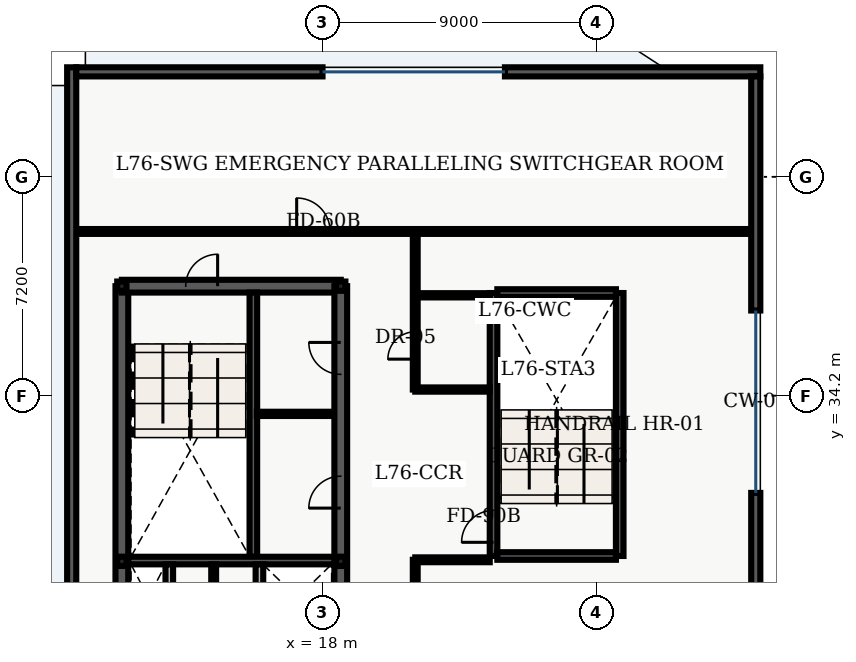
"""IFC4 building model, lengths in metres.
Left out: names, types, materials, properties, quantities, classifications, styles, units other than length and angle.
Written with IfcOpenShell. Run it as: python <this file> out.ifc"""

import sys

from ifc_helpers import new_model, entity, si_unit, converted_unit, direction, frame, origin_with_axes, origin_2d_with_axis, place, context, subcontext, project, spatial, polyline, rectangle, hollow_rectangle, outline, extrude, element, fill, save


model = new_model("IFC4")
c1 = context("Model", 3, precision=1e-05, world=origin_with_axes(), true_north=direction((0.0, 1.0)))
c2 = subcontext(c1, "Body", "Model", "MODEL_VIEW")
j1 = project(units=[si_unit("LENGTHUNIT", "METRE"), converted_unit("PLANEANGLEUNIT", "DEGREE", entity("IfcPlaneAngleMeasure", 0.017), si_unit("PLANEANGLEUNIT", "RADIAN"), dimensions=[0, 0, 0, 0, 0, 0, 0])], contexts=[c1])
p1 = place(None, origin_with_axes())
s1 = spatial("IfcSite", under=j1, at=p1, CompositionType="ELEMENT")
p2 = place(p1, origin_with_axes())
s2 = spatial("IfcBuilding", under=s1, at=p2, CompositionType="ELEMENT")
p3 = place(p2, frame((0.0, 0.0, 308.7), z_axis=(0.0, 0.0, 1.0), x_axis=(1.0, 0.0, 0.0)))
s3 = spatial("IfcBuildingStorey", under=s2, at=p3, CompositionType="ELEMENT", Elevation=308.7)
p4 = place(p3, frame((11.4, 10.8, 0.0), z_axis=(0.0, 0.0, 1.0), x_axis=(0.0, 1.0, 0.0)))
e1 = element("IfcWall", 1, at=p4, inside=s3, PredefinedType="SHEAR", context=c2, shape_type="SweptSolid", body=[
    extrude(outline(polyline([(0.0, -0.21), (27.0, -0.21), (27.0, 0.21), (0.0, 0.21), (0.0, -0.21)])), origin_with_axes(), (0.0, 0.0, 1.0), 3.64),
])
p5 = place(p3, frame((11.4, 37.8, 0.0), z_axis=(0.0, 0.0, 1.0), x_axis=(1.0, 0.0, 0.0)))
e2 = element("IfcWall", 2, at=p5, inside=s3, PredefinedType="SHEAR", context=c2, shape_type="SweptSolid", body=[
    extrude(outline(polyline([(0.0, -0.21), (7.2, -0.21), (7.2, 0.21), (0.0, 0.21), (0.0, -0.21)])), origin_with_axes(), (0.0, 0.0, 1.0), 3.64),
])
p6 = place(p5, frame((2.625, 0.0, 0.0), z_axis=(0.0, 0.0, 1.0), x_axis=(1.0, 0.0, 0.0)))
e3 = element("IfcOpeningElement", 3, at=p6, cuts=e2, PredefinedType="OPENING", context=c2, shape_type="SweptSolid", body=[
    extrude(rectangle(XDim=1.05, YDim=0.44, at=origin_2d_with_axis()), origin_with_axes(), (0.0, 0.0, 1.0), 2.15),
])
p7 = place(p3, frame((18.6, 24.3, 0.0), z_axis=(0.0, 0.0, 1.0), x_axis=(0.0, 1.0, 0.0)))
e4 = element("IfcWall", 4, at=p7, inside=s3, PredefinedType="SHEAR", context=c2, shape_type="SweptSolid", body=[
    extrude(outline(polyline([(0.0, -0.21), (13.5, -0.21), (13.5, 0.21), (0.0, 0.21), (0.0, -0.21)])), origin_with_axes(), (0.0, 0.0, 1.0), 3.64),
])
p8 = place(p7, frame((6.725, 0.0, 0.0), z_axis=(0.0, 0.0, 1.0), x_axis=(1.0, 0.0, 0.0)))
e5 = element("IfcOpeningElement", 5, at=p8, cuts=e4, PredefinedType="OPENING", context=c2, shape_type="SweptSolid", body=[
    extrude(rectangle(XDim=1.05, YDim=0.44, at=origin_2d_with_axis()), origin_with_axes(), (0.0, 0.0, 1.0), 2.15),
])
p9 = place(p7, frame((11.125, 0.0, 0.0), z_axis=(0.0, 0.0, 1.0), x_axis=(1.0, 0.0, 0.0)))
e6 = element("IfcOpeningElement", 6, at=p9, cuts=e4, PredefinedType="OPENING", context=c2, shape_type="SweptSolid", body=[
    extrude(rectangle(XDim=1.05, YDim=0.44, at=origin_2d_with_axis()), origin_with_axes(), (0.0, 0.0, 1.0), 2.15),
])
p10 = place(p3, frame((15.725, 28.9, 0.0), z_axis=(0.0, 0.0, 1.0), x_axis=(0.0, 1.0, 0.0)))
e7 = element("IfcWall", 7, at=p10, inside=s3, PredefinedType="SHEAR", context=c2, shape_type="SweptSolid", body=[
    extrude(outline(polyline([(0.0, -0.125), (8.69, -0.125), (8.69, 0.125), (0.0, 0.125), (0.0, -0.125)])), origin_with_axes(), (0.0, 0.0, 1.0), 3.64),
])
p11 = place(p3, frame((11.61, 28.775, 0.0), z_axis=(0.0, 0.0, 1.0), x_axis=(1.0, 0.0, 0.0)))
e8 = element("IfcWall", 8, at=p11, inside=s3, PredefinedType="SHEAR", context=c2, shape_type="SweptSolid", body=[
    extrude(outline(polyline([(0.0, -0.125), (6.78, -0.125), (6.78, 0.125), (0.0, 0.125), (0.0, -0.125)])), origin_with_axes(), (0.0, 0.0, 1.0), 3.64),
])
for number, where, z_axis, x_axis in (
    (9, (12.96, 26.45, 0.0), (0.0, 0.0, 1.0), (0.0, 1.0, 0.0)),
    (10, (15.925, 26.45, 0.0), (0.0, 0.0, 1.0), (0.0, 1.0, 0.0)),
):
    element("IfcWall", number, at=place(p3, frame(where, z_axis=z_axis, x_axis=x_axis)), inside=s3, PredefinedType="SOLIDWALL", context=c2, shape_type="SweptSolid", body=[
        extrude(outline(polyline([(0.0, -0.125), (2.2, -0.125), (2.2, 0.125), (0.0, 0.125), (0.0, -0.125)])), origin_with_axes(), (0.0, 0.0, 1.0), 2.68),
    ])
p12 = place(p3, frame((23.625, 28.925, 0.0), z_axis=(0.0, 0.0, 1.0), x_axis=(0.0, 1.0, 0.0)))
e11 = element("IfcWall", 11, at=p12, inside=s3, PredefinedType="SHEAR", context=c2, shape_type="SweptSolid", body=[
    extrude(outline(polyline([(0.0, -0.125), (8.65, -0.125), (8.65, 0.125), (0.0, 0.125), (0.0, -0.125)])), origin_with_axes(), (0.0, 0.0, 1.0), 3.64),
])
p13 = place(p12, frame((0.975, 0.0, 0.0), z_axis=(0.0, 0.0, 1.0), x_axis=(1.0, 0.0, 0.0)))
e12 = element("IfcOpeningElement", 12, at=p13, cuts=e11, PredefinedType="OPENING", context=c2, shape_type="SweptSolid", body=[
    extrude(rectangle(XDim=1.05, YDim=0.27, at=origin_2d_with_axis()), origin_with_axes(), (0.0, 0.0, 1.0), 2.15),
])
p14 = place(p3, frame((27.775, 28.925, 0.0), z_axis=(0.0, 0.0, 1.0), x_axis=(0.0, 1.0, 0.0)))
e13 = element("IfcWall", 13, at=p14, inside=s3, PredefinedType="SHEAR", context=c2, shape_type="SweptSolid", body=[
    extrude(outline(polyline([(0.0, -0.125), (8.65, -0.125), (8.65, 0.125), (0.0, 0.125), (0.0, -0.125)])), origin_with_axes(), (0.0, 0.0, 1.0), 3.64),
])
for number, where, z_axis, x_axis in (
    (14, (23.75, 28.925, 0.0), (0.0, 0.0, 1.0), (1.0, 0.0, 0.0)),
    (15, (23.75, 37.575, 0.0), (0.0, 0.0, 1.0), (1.0, 0.0, 0.0)),
):
    element("IfcWall", number, at=place(p3, frame(where, z_axis=z_axis, x_axis=x_axis)), inside=s3, PredefinedType="SHEAR", context=c2, shape_type="SweptSolid", body=[
        extrude(outline(polyline([(0.0, -0.125), (3.9, -0.125), (3.9, 0.125), (0.0, 0.125), (0.0, -0.125)])), origin_with_axes(), (0.0, 0.0, 1.0), 3.64),
    ])
for number, where, z_axis, x_axis in (
    (16, (11.4, 28.75, 0.0), (0.0, 0.0, 1.0), (1.0, 0.0, 0.0)),
    (17, (11.4, 37.8, 0.0), (0.0, 0.0, 1.0), (1.0, 0.0, 0.0)),
    (18, (18.6, 28.75, 0.0), (0.0, 0.0, 1.0), (1.0, 0.0, 0.0)),
    (19, (18.6, 37.8, 0.0), (0.0, 0.0, 1.0), (1.0, 0.0, 0.0)),
):
    element("IfcColumn", number, at=place(p3, frame(where, z_axis=z_axis, x_axis=x_axis)), inside=s3, PredefinedType="COLUMN", context=c2, shape_type="SweptSolid", body=[
        extrude(hollow_rectangle(XDim=0.305, YDim=0.305, WallThickness=0.015, InnerFilletRadius=0.015, OuterFilletRadius=0.03, at=origin_2d_with_axis()), origin_with_axes(), (0.0, 0.0, 1.0), 3.9),
    ])
p15 = place(p3, frame((14.42, 26.45, 0.0), z_axis=(0.0, 0.0, 1.0), x_axis=(0.0, 1.0, 0.0)))
e20 = element("IfcWall", 20, at=p15, inside=s3, PredefinedType="PARTITIONING", context=c2, shape_type="SweptSolid", body=[
    extrude(outline(polyline([(0.0, -0.08), (2.2, -0.08), (2.2, 0.08), (0.0, 0.08), (0.0, -0.08)])), origin_with_axes(), (0.0, 0.0, 1.0), 2.68),
])
p16 = place(p15, frame((1.1, 0.0, 0.0), z_axis=(0.0, 0.0, 1.0), x_axis=(1.0, 0.0, 0.0)))
e21 = element("IfcOpeningElement", 21, at=p16, cuts=e20, PredefinedType="OPENING", context=c2, shape_type="SweptSolid", body=[
    extrude(rectangle(XDim=0.9, YDim=0.18, at=origin_2d_with_axis()), origin_with_axes(), (0.0, 0.0, 1.0), 2.15),
])
p17 = place(p3, frame((15.84, 33.6, 0.0), z_axis=(0.0, 0.0, 1.0), x_axis=(1.0, 0.0, 0.0)))
e22 = element("IfcWall", 22, at=p17, inside=s3, PredefinedType="PARTITIONING", context=c2, shape_type="SweptSolid", body=[
    extrude(outline(polyline([(0.0, -0.07), (2.46, -0.07), (2.46, 0.07), (0.0, 0.07), (0.0, -0.07)])), origin_with_axes(), (0.0, 0.0, 1.0), 2.68),
])
for number, where, z_axis, x_axis in (
    (23, (21.05, 34.4, 0.0), (0.0, 0.0, 1.0), (1.0, 0.0, 0.0)),
    (24, (21.05, 37.5, 0.0), (0.0, 0.0, 1.0), (1.0, 0.0, 0.0)),
):
    element("IfcWall", number, at=place(p3, frame(where, z_axis=z_axis, x_axis=x_axis)), inside=s3, PredefinedType="PARTITIONING", context=c2, shape_type="SweptSolid", body=[
        extrude(outline(polyline([(0.0, -0.07), (2.45, -0.07), (2.45, 0.07), (0.0, 0.07), (0.0, -0.07)])), origin_with_axes(), (0.0, 0.0, 1.0), 2.68),
    ])
p18 = place(p3, frame((21.05, 3.895, 0.0), z_axis=(0.0, 0.0, 1.0), x_axis=(0.0, 1.0, 0.0)))
e25 = element("IfcWall", 25, at=p18, inside=s3, PredefinedType="PARTITIONING", context=c2, shape_type="SweptSolid", body=[
    extrude(outline(polyline([(0.0, -0.08), (24.905, -0.08), (24.905, 0.08), (0.0, 0.08), (0.0, -0.08)])), origin_with_axes(), (0.0, 0.0, 1.0), 2.68),
])
p19 = place(p18, frame((4.78, 0.0, 0.0), z_axis=(0.0, 0.0, 1.0), x_axis=(1.0, 0.0, 0.0)))
e26 = element("IfcOpeningElement", 26, at=p19, cuts=e25, PredefinedType="OPENING", context=c2, shape_type="SweptSolid", body=[
    extrude(rectangle(XDim=1.05, YDim=0.18, at=origin_2d_with_axis()), origin_with_axes(), (0.0, 0.0, 1.0), 2.15),
])
p20 = place(p3, frame((21.05, 34.4, 0.0), z_axis=(0.0, 0.0, 1.0), x_axis=(0.0, 1.0, 0.0)))
e27 = element("IfcWall", 27, at=p20, inside=s3, PredefinedType="PARTITIONING", context=c2, shape_type="SweptSolid", body=[
    extrude(outline(polyline([(0.0, -0.08), (5.2, -0.08), (5.2, 0.08), (0.0, 0.08), (0.0, -0.08)])), origin_with_axes(), (0.0, 0.0, 1.0), 2.68),
])
p21 = place(p20, frame((1.45, 0.0, 0.0), z_axis=(0.0, 0.0, 1.0), x_axis=(1.0, 0.0, 0.0)))
e28 = element("IfcOpeningElement", 28, at=p21, cuts=e27, PredefinedType="OPENING", context=c2, shape_type="SweptSolid", body=[
    extrude(rectangle(XDim=0.9, YDim=0.18, at=origin_2d_with_axis()), origin_with_axes(), (0.0, 0.0, 1.0), 2.15),
])
p22 = place(p3, frame((21.05, 28.8, 0.0), z_axis=(0.0, 0.0, 1.0), x_axis=(1.0, 0.0, 0.0)))
e29 = element("IfcWall", 29, at=p22, inside=s3, PredefinedType="PARTITIONING", context=c2, shape_type="SweptSolid", body=[
    extrude(outline(polyline([(0.0, -0.08), (2.45, -0.08), (2.45, 0.08), (0.0, 0.08), (0.0, -0.08)])), origin_with_axes(), (0.0, 0.0, 1.0), 2.68),
])
p23 = place(p3, frame((9.895, 39.6, 0.0), z_axis=(0.0, 0.0, 1.0), x_axis=(1.0, 0.0, 0.0)))
e30 = element("IfcWall", 30, at=p23, inside=s3, PredefinedType="PARTITIONING", context=c2, shape_type="SweptSolid", body=[
    extrude(outline(polyline([(0.0, -0.08), (22.21, -0.08), (22.21, 0.08), (0.0, 0.08), (0.0, -0.08)])), origin_with_axes(), (0.0, 0.0, 1.0), 2.68),
])
p24 = place(p23, frame((7.805, 0.0, 0.0), z_axis=(0.0, 0.0, 1.0), x_axis=(1.0, 0.0, 0.0)))
e31 = element("IfcOpeningElement", 31, at=p24, cuts=e30, PredefinedType="OPENING", context=c2, shape_type="SweptSolid", body=[
    extrude(rectangle(XDim=1.1, YDim=0.18, at=origin_2d_with_axis()), origin_with_axes(), (0.0, 0.0, 1.0), 2.15),
])
p25 = place(p3, frame((9.75, 3.9, 0.0), z_axis=(0.0, 0.0, 1.0), x_axis=(0.0, 1.0, 0.0)))
e32 = element("IfcWall", 32, at=p25, inside=s3, PredefinedType="SOLIDWALL", context=c2, shape_type="SweptSolid", body=[
    extrude(outline(polyline([(0.0, -0.15), (41.1, -0.15), (41.1, 0.15), (0.0, 0.15), (0.0, -0.15)])), origin_with_axes(), (0.0, 0.0, 1.0), 3.64),
])
p26 = place(p3, frame((9.9, 44.85, 0.0), z_axis=(0.0, 0.0, 1.0), x_axis=(1.0, 0.0, 0.0)))
e33 = element("IfcWall", 33, at=p26, inside=s3, PredefinedType="SOLIDWALL", context=c2, shape_type="SweptSolid", body=[
    extrude(outline(polyline([(0.0, -0.15), (8.1, -0.15), (8.1, 0.15), (0.0, 0.15), (0.0, -0.15)])), origin_with_axes(), (0.0, 0.0, 1.0), 3.64),
])
p27 = place(p3, frame((24.0, 44.85, 0.0), z_axis=(0.0, 0.0, 1.0), x_axis=(1.0, 0.0, 0.0)))
e34 = element("IfcWall", 34, at=p27, inside=s3, PredefinedType="SOLIDWALL", context=c2, shape_type="SweptSolid", body=[
    extrude(outline(polyline([(0.0, -0.15), (8.4, -0.15), (8.4, 0.15), (0.0, 0.15), (0.0, -0.15)])), origin_with_axes(), (0.0, 0.0, 1.0), 3.64),
])
p28 = place(p3, frame((32.25, 44.7, 0.0), z_axis=(0.0, 0.0, 1.0), x_axis=(0.0, -1.0, 0.0)))
e35 = element("IfcWall", 35, at=p28, inside=s3, PredefinedType="SOLIDWALL", context=c2, shape_type="SweptSolid", body=[
    extrude(outline(polyline([(0.0, -0.15), (7.7, -0.15), (7.7, 0.15), (0.0, 0.15), (0.0, -0.15)])), origin_with_axes(), (0.0, 0.0, 1.0), 3.64),
])
p29 = place(p3, frame((32.25, 31.0, 0.0), z_axis=(0.0, 0.0, 1.0), x_axis=(0.0, -1.0, 0.0)))
e36 = element("IfcWall", 36, at=p29, inside=s3, PredefinedType="SOLIDWALL", context=c2, shape_type="SweptSolid", body=[
    extrude(outline(polyline([(0.0, -0.15), (27.4, -0.15), (27.4, 0.15), (0.0, 0.15), (0.0, -0.15)])), origin_with_axes(), (0.0, 0.0, 1.0), 3.64),
])
p30 = place(p5, frame((2.625, 0.0, 0.0), z_axis=(0.0, 0.0, 1.0), x_axis=(1.0, 0.0, 0.0)))
e37 = element("IfcDoor", 37, at=p30, inside=s3, OperationType="SINGLE_SWING_RIGHT", PredefinedType="DOOR", context=c2, shape_type="SweptSolid", body=[
    extrude(rectangle(XDim=1.05, YDim=0.09, at=origin_2d_with_axis()), origin_with_axes(), (0.0, 0.0, 1.0), 2.15),
])
fill(e3, e37)
p31 = place(p7, frame((6.725, 0.0, 0.0), z_axis=(0.0, 0.0, 1.0), x_axis=(1.0, 0.0, 0.0)))
e38 = element("IfcDoor", 38, at=p31, inside=s3, OperationType="SINGLE_SWING_LEFT", PredefinedType="DOOR", context=c2, shape_type="SweptSolid", body=[
    extrude(rectangle(XDim=1.05, YDim=0.09, at=origin_2d_with_axis()), origin_with_axes(), (0.0, 0.0, 1.0), 2.15),
])
fill(e5, e38)
p32 = place(p7, frame((11.125, 0.0, 0.0), z_axis=(0.0, 0.0, 1.0), x_axis=(1.0, 0.0, 0.0)))
e39 = element("IfcDoor", 39, at=p32, inside=s3, OperationType="SINGLE_SWING_RIGHT", PredefinedType="DOOR", context=c2, shape_type="SweptSolid", body=[
    extrude(rectangle(XDim=1.05, YDim=0.09, at=origin_2d_with_axis()), origin_with_axes(), (0.0, 0.0, 1.0), 2.15),
])
fill(e6, e39)
p33 = place(p12, frame((0.975, 0.0, 0.0), z_axis=(0.0, 0.0, 1.0), x_axis=(1.0, 0.0, 0.0)))
e40 = element("IfcDoor", 40, at=p33, inside=s3, OperationType="SINGLE_SWING_LEFT", PredefinedType="DOOR", context=c2, shape_type="SweptSolid", body=[
    extrude(rectangle(XDim=1.05, YDim=0.09, at=origin_2d_with_axis()), origin_with_axes(), (0.0, 0.0, 1.0), 2.15),
])
fill(e12, e40)
p34 = place(p20, frame((1.45, 0.0, 0.0), z_axis=(0.0, 0.0, 1.0), x_axis=(1.0, 0.0, 0.0)))
e41 = element("IfcDoor", 41, at=p34, inside=s3, OperationType="SINGLE_SWING_LEFT", PredefinedType="DOOR", context=c2, shape_type="SweptSolid", body=[
    extrude(rectangle(XDim=0.9, YDim=0.09, at=origin_2d_with_axis()), origin_with_axes(), (0.0, 0.0, 1.0), 2.15),
])
fill(e28, e41)
p35 = place(p23, frame((7.805, 0.0, 0.0), z_axis=(0.0, 0.0, 1.0), x_axis=(1.0, 0.0, 0.0)))
e42 = element("IfcDoor", 42, at=p35, inside=s3, OperationType="SINGLE_SWING_LEFT", PredefinedType="DOOR", context=c2, shape_type="SweptSolid", body=[
    extrude(rectangle(XDim=1.1, YDim=0.09, at=origin_2d_with_axis()), origin_with_axes(), (0.0, 0.0, 1.0), 2.15),
])
fill(e31, e42)
save(model, sys.argv[1])
